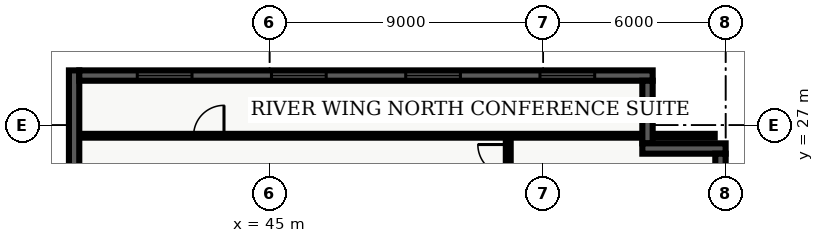
"""IFC4 building model, lengths in metres.
Left out: names, types, materials, properties, quantities, classifications, styles, units other than length and angle.
Written with IfcOpenShell. Run it as: python <this file> out.ifc"""

import sys

from ifc_helpers import new_model, entity, si_unit, converted_unit, direction, frame, origin_with_axes, origin_2d_with_axis, place, context, subcontext, project, spatial, polyline, rectangle, outline, extrude, element, fill, save


model = new_model("IFC4")
c1 = context("Model", 3, precision=1e-05, world=origin_with_axes(), true_north=direction((0.0, 1.0)))
c2 = subcontext(c1, "Body", "Model", "MODEL_VIEW")
j1 = project(units=[si_unit("LENGTHUNIT", "METRE"), converted_unit("PLANEANGLEUNIT", "DEGREE", entity("IfcPlaneAngleMeasure", 0.017), si_unit("PLANEANGLEUNIT", "RADIAN"), dimensions=[0, 0, 0, 0, 0, 0, 0])], contexts=[c1])
p1 = place(None, origin_with_axes())
s1 = spatial("IfcSite", under=j1, at=p1, CompositionType="ELEMENT")
p2 = place(p1, origin_with_axes())
s2 = spatial("IfcBuilding", under=s1, at=p2, CompositionType="ELEMENT")
p3 = place(p2, frame((0.0, 0.0, 179.7), z_axis=(0.0, 0.0, 1.0), x_axis=(1.0, 0.0, 0.0)))
s3 = spatial("IfcBuildingStorey", under=s2, at=p3, CompositionType="ELEMENT", Elevation=179.7)
p4 = place(p3, frame((52.85, 7.85, 0.0), z_axis=(0.0, 0.0, 1.0), x_axis=(0.0, 1.0, 0.0)))
e1 = element("IfcWall", 1, at=p4, inside=s3, PredefinedType="PARTITIONING", context=c2, shape_type="SweptSolid", body=[
    extrude(outline(polyline([(0.0, -0.08), (18.8, -0.08), (18.8, 0.08), (0.0, 0.08), (0.0, -0.08)])), origin_with_axes(), (0.0, 0.0, 1.0), 2.7),
])
p5 = place(p4, frame((4.485, 0.0, 0.0), z_axis=(0.0, 0.0, 1.0), x_axis=(1.0, 0.0, 0.0)))
e2 = element("IfcOpeningElement", 2, at=p5, cuts=e1, PredefinedType="OPENING", context=c2, shape_type="SweptSolid", body=[
    extrude(rectangle(XDim=1.0, YDim=0.18, at=origin_2d_with_axis()), origin_with_axes(), (0.0, 0.0, 1.0), 2.15),
])
p6 = place(p4, frame((7.897, 0.0, 0.0), z_axis=(0.0, 0.0, 1.0), x_axis=(1.0, 0.0, 0.0)))
e3 = element("IfcOpeningElement", 3, at=p6, cuts=e1, PredefinedType="OPENING", context=c2, shape_type="SweptSolid", body=[
    extrude(rectangle(XDim=1.0, YDim=0.18, at=origin_2d_with_axis()), origin_with_axes(), (0.0, 0.0, 1.0), 2.15),
])
p7 = place(p4, frame((11.964, 0.0, 0.0), z_axis=(0.0, 0.0, 1.0), x_axis=(1.0, 0.0, 0.0)))
e4 = element("IfcOpeningElement", 4, at=p7, cuts=e1, PredefinedType="OPENING", context=c2, shape_type="SweptSolid", body=[
    extrude(rectangle(XDim=1.0, YDim=0.18, at=origin_2d_with_axis()), origin_with_axes(), (0.0, 0.0, 1.0), 2.15),
])
p8 = place(p4, frame((18.011, 0.0, 0.0), z_axis=(0.0, 0.0, 1.0), x_axis=(1.0, 0.0, 0.0)))
e5 = element("IfcOpeningElement", 5, at=p8, cuts=e1, PredefinedType="OPENING", context=c2, shape_type="SweptSolid", body=[
    extrude(rectangle(XDim=1.0, YDim=0.18, at=origin_2d_with_axis()), origin_with_axes(), (0.0, 0.0, 1.0), 2.15),
])
p9 = place(p3, frame((38.735, 26.65, 0.0), z_axis=(0.0, 0.0, 1.0), x_axis=(1.0, 0.0, 0.0)))
e6 = element("IfcWall", 6, at=p9, inside=s3, PredefinedType="PARTITIONING", context=c2, shape_type="SweptSolid", body=[
    extrude(outline(polyline([(0.0, -0.062), (20.905, -0.062), (20.905, 0.062), (0.0, 0.062), (0.0, -0.062)])), origin_with_axes(), (0.0, 0.0, 1.0), 2.7),
])
p10 = place(p9, frame((4.265, 0.0, 0.0), z_axis=(0.0, 0.0, 1.0), x_axis=(1.0, 0.0, 0.0)))
e7 = element("IfcOpeningElement", 7, at=p10, cuts=e6, PredefinedType="OPENING", context=c2, shape_type="SweptSolid", body=[
    extrude(rectangle(XDim=1.0, YDim=0.145, at=origin_2d_with_axis()), origin_with_axes(), (0.0, 0.0, 1.0), 2.15),
])
p11 = place(p3, frame((38.57, 21.26, 0.0), z_axis=(0.0, 0.0, 1.0), x_axis=(0.0, 1.0, 0.0)))
e8 = element("IfcWall", 8, at=p11, inside=s3, PredefinedType="SOLIDWALL", context=c2, shape_type="SweptSolid", body=[
    extrude(outline(polyline([(0.0, -0.17), (7.54, -0.17), (7.54, 0.17), (0.0, 0.17), (0.0, -0.17)])), origin_with_axes(), (0.0, 0.0, 1.0), 3.66),
])
p12 = place(p3, frame((38.74, 28.63, 0.0), z_axis=(0.0, 0.0, 1.0), x_axis=(1.0, 0.0, 0.0)))
e9 = element("IfcWall", 9, at=p12, inside=s3, PredefinedType="SOLIDWALL", context=c2, shape_type="SweptSolid", body=[
    extrude(outline(polyline([(0.0, -0.17), (18.86, -0.17), (18.86, 0.17), (0.0, 0.17), (0.0, -0.17)])), origin_with_axes(), (0.0, 0.0, 1.0), 3.66),
])
p13 = place(p12, frame((2.808, 0.0, 0.45), z_axis=(0.0, 0.0, 1.0), x_axis=(1.0, 0.0, 0.0)))
e10 = element("IfcOpeningElement", 10, at=p13, cuts=e9, PredefinedType="OPENING", context=c2, shape_type="SweptSolid", body=[
    extrude(rectangle(XDim=1.8, YDim=0.36, at=origin_2d_with_axis()), origin_with_axes(), (0.0, 0.0, 1.0), 2.1),
])
p14 = place(p12, frame((7.222, 0.0, 0.45), z_axis=(0.0, 0.0, 1.0), x_axis=(1.0, 0.0, 0.0)))
e11 = element("IfcOpeningElement", 11, at=p14, cuts=e9, PredefinedType="OPENING", context=c2, shape_type="SweptSolid", body=[
    extrude(rectangle(XDim=1.8, YDim=0.36, at=origin_2d_with_axis()), origin_with_axes(), (0.0, 0.0, 1.0), 2.1),
])
p15 = place(p12, frame((11.637, 0.0, 0.45), z_axis=(0.0, 0.0, 1.0), x_axis=(1.0, 0.0, 0.0)))
e12 = element("IfcOpeningElement", 12, at=p15, cuts=e9, PredefinedType="OPENING", context=c2, shape_type="SweptSolid", body=[
    extrude(rectangle(XDim=1.8, YDim=0.36, at=origin_2d_with_axis()), origin_with_axes(), (0.0, 0.0, 1.0), 2.1),
])
p16 = place(p12, frame((16.053, 0.0, 0.45), z_axis=(0.0, 0.0, 1.0), x_axis=(1.0, 0.0, 0.0)))
e13 = element("IfcOpeningElement", 13, at=p16, cuts=e9, PredefinedType="OPENING", context=c2, shape_type="SweptSolid", body=[
    extrude(rectangle(XDim=1.8, YDim=0.36, at=origin_2d_with_axis()), origin_with_axes(), (0.0, 0.0, 1.0), 2.1),
])
p17 = place(p3, frame((57.43, 28.46, 0.0), z_axis=(0.0, 0.0, 1.0), x_axis=(0.0, -1.0, 0.0)))
e14 = element("IfcWall", 14, at=p17, inside=s3, PredefinedType="SOLIDWALL", context=c2, shape_type="SweptSolid", body=[
    extrude(outline(polyline([(0.0, -0.17), (2.06, -0.17), (2.06, 0.17), (0.0, 0.17), (0.0, -0.17)])), origin_with_axes(), (0.0, 0.0, 1.0), 3.66),
])
p18 = place(p3, frame((57.26, 26.23, 0.0), z_axis=(0.0, 0.0, 1.0), x_axis=(1.0, 0.0, 0.0)))
e15 = element("IfcWall", 15, at=p18, inside=s3, PredefinedType="SOLIDWALL", context=c2, shape_type="SweptSolid", body=[
    extrude(outline(polyline([(0.0, -0.17), (2.74, -0.17), (2.74, 0.17), (0.0, 0.17), (0.0, -0.17)])), origin_with_axes(), (0.0, 0.0, 1.0), 3.66),
])
p19 = place(p3, frame((59.83, 26.06, 0.0), z_axis=(0.0, 0.0, 1.0), x_axis=(0.0, -1.0, 0.0)))
e16 = element("IfcWall", 16, at=p19, inside=s3, PredefinedType="SOLIDWALL", context=c2, shape_type="SweptSolid", body=[
    extrude(outline(polyline([(0.0, -0.17), (23.66, -0.17), (23.66, 0.17), (0.0, 0.17), (0.0, -0.17)])), origin_with_axes(), (0.0, 0.0, 1.0), 3.66),
])
p20 = place(p19, frame((20.364, 0.0, 0.45), z_axis=(0.0, 0.0, 1.0), x_axis=(1.0, 0.0, 0.0)))
e17 = element("IfcOpeningElement", 17, at=p20, cuts=e16, PredefinedType="OPENING", context=c2, shape_type="SweptSolid", body=[
    extrude(rectangle(XDim=1.8, YDim=0.36, at=origin_2d_with_axis()), origin_with_axes(), (0.0, 0.0, 1.0), 2.1),
])
p21 = place(p9, frame((4.265, 0.0, 0.0), z_axis=(0.0, 0.0, 1.0), x_axis=(1.0, 0.0, 0.0)))
e18 = element("IfcDoor", 18, at=p21, inside=s3, OperationType="SINGLE_SWING_RIGHT", PredefinedType="DOOR", context=c2, shape_type="SweptSolid", body=[
    extrude(rectangle(XDim=1.0, YDim=0.075, at=origin_2d_with_axis()), origin_with_axes(), (0.0, 0.0, 1.0), 2.15),
])
fill(e7, e18)
p22 = place(p4, frame((18.011, 0.0, 0.0), z_axis=(0.0, 0.0, 1.0), x_axis=(1.0, 0.0, 0.0)))
e19 = element("IfcDoor", 19, at=p22, inside=s3, OperationType="SINGLE_SWING_RIGHT", PredefinedType="DOOR", context=c2, shape_type="SweptSolid", body=[
    extrude(rectangle(XDim=1.0, YDim=0.09, at=origin_2d_with_axis()), origin_with_axes(), (0.0, 0.0, 1.0), 2.15),
])
fill(e5, e19)
p23 = place(p12, frame((2.808, 0.0, 0.45), z_axis=(0.0, 0.0, 1.0), x_axis=(1.0, 0.0, 0.0)))
e20 = element("IfcWindow", 20, at=p23, inside=s3, PredefinedType="WINDOW", context=c2, shape_type="SweptSolid", body=[
    extrude(rectangle(XDim=1.8, YDim=0.09, at=origin_2d_with_axis()), origin_with_axes(), (0.0, 0.0, 1.0), 2.1),
])
fill(e10, e20)
p24 = place(p12, frame((7.222, 0.0, 0.45), z_axis=(0.0, 0.0, 1.0), x_axis=(1.0, 0.0, 0.0)))
e21 = element("IfcWindow", 21, at=p24, inside=s3, PredefinedType="WINDOW", context=c2, shape_type="SweptSolid", body=[
    extrude(rectangle(XDim=1.8, YDim=0.09, at=origin_2d_with_axis()), origin_with_axes(), (0.0, 0.0, 1.0), 2.1),
])
fill(e11, e21)
p25 = place(p12, frame((11.637, 0.0, 0.45), z_axis=(0.0, 0.0, 1.0), x_axis=(1.0, 0.0, 0.0)))
e22 = element("IfcWindow", 22, at=p25, inside=s3, PredefinedType="WINDOW", context=c2, shape_type="SweptSolid", body=[
    extrude(rectangle(XDim=1.8, YDim=0.09, at=origin_2d_with_axis()), origin_with_axes(), (0.0, 0.0, 1.0), 2.1),
])
fill(e12, e22)
p26 = place(p12, frame((16.053, 0.0, 0.45), z_axis=(0.0, 0.0, 1.0), x_axis=(1.0, 0.0, 0.0)))
e23 = element("IfcWindow", 23, at=p26, inside=s3, PredefinedType="WINDOW", context=c2, shape_type="SweptSolid", body=[
    extrude(rectangle(XDim=1.8, YDim=0.09, at=origin_2d_with_axis()), origin_with_axes(), (0.0, 0.0, 1.0), 2.1),
])
fill(e13, e23)
save(model, sys.argv[1])
